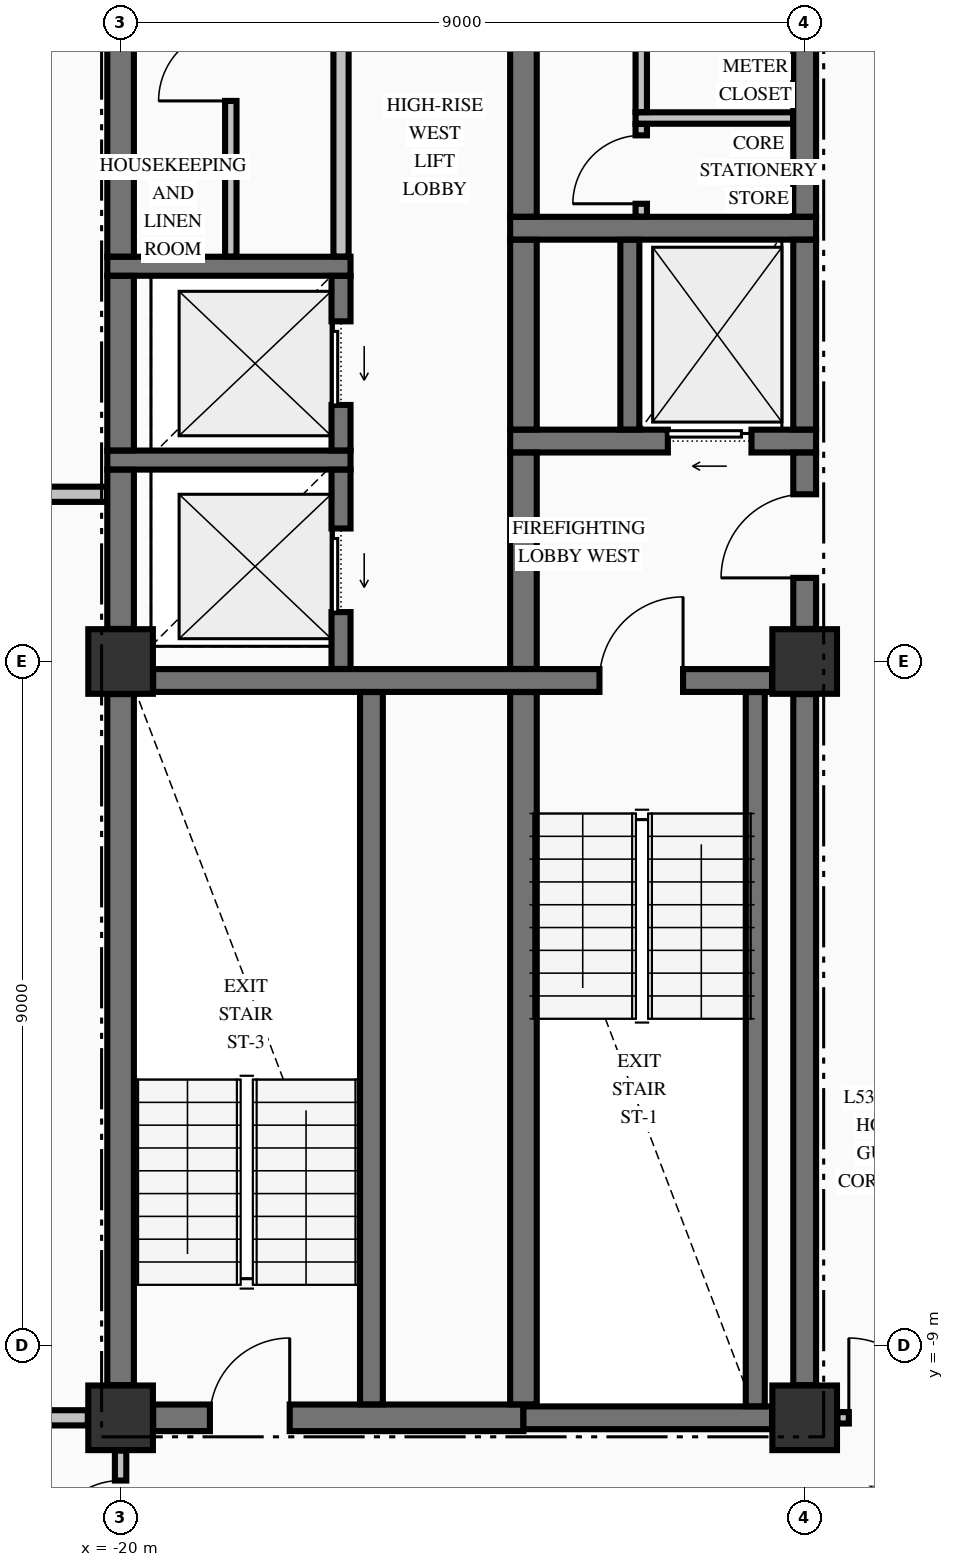
"""IFC4 building model, lengths in metres.
Left out: names, types, materials, properties, quantities, classifications, styles, units other than length and angle.
Written with IfcOpenShell. Run it as: python <this file> out.ifc"""

import sys

from ifc_helpers import new_model, si_unit, direction, frame, frame_2d, origin, origin_2d, place, context, subcontext, project, spatial, rectangle, extrude, element, fill, save


model = new_model("IFC4")
c1 = context("Model", 3, precision=1e-05, world=origin(), true_north=direction((0.0, 1.0)))
c2 = subcontext(c1, "Body", "Model", "MODEL_VIEW")
j1 = project(units=[si_unit("LENGTHUNIT", "METRE"), si_unit("PLANEANGLEUNIT", "RADIAN")], contexts=[c1])
p1 = place(None, origin())
s1 = spatial("IfcSite", under=j1, at=p1, CompositionType="ELEMENT")
p2 = place(p1, origin())
s2 = spatial("IfcBuilding", under=s1, at=p2, CompositionType="ELEMENT")
p3 = place(p2, frame((0.0, 0.0, 205.06)))
s3 = spatial("IfcBuildingStorey", under=s2, at=p3, CompositionType="ELEMENT", Elevation=205.06)
for number, where, z_axis, x_axis in (
    (1, (-20.0, -9.95, -0.25), (0.0, 0.0, 1.0), (1.0, 0.0, 0.0)),
    (2, (-11.0, -9.95, -0.25), (0.0, 0.0, 1.0), (1.0, 0.0, 0.0)),
    (3, (-11.0, 0.0, -0.25), (0.0, 0.0, 1.0), (1.0, 0.0, 0.0)),
    (4, (-20.0, 0.0, -0.25), (0.0, 0.0, 1.0), (1.0, 0.0, 0.0)),
):
    element("IfcColumn", number, at=place(p3, frame(where, z_axis=z_axis, x_axis=x_axis)), inside=s3, PredefinedType="COLUMN", context=c2, shape_type="SweptSolid", body=[
        extrude(rectangle(XDim=0.85, YDim=0.85, at=origin_2d()), origin(), (0.0, 0.0, 1.0), 3.4),
    ])
p4 = place(p3, frame((-19.571, -9.95, 0.0), z_axis=(0.0, 0.0, 1.0), x_axis=(1.0, 0.0, 0.0)))
e5 = element("IfcWall", 5, at=p4, inside=s3, PredefinedType="SHEAR", context=c2, shape_type="SweptSolid", body=[
    extrude(rectangle(XDim=4.871, YDim=0.35, at=frame_2d((2.436, 0.0))), origin(), (0.0, 0.0, 1.0), 3.15),
])
p5 = place(p4, frame((0.746, 0.0, 0.0)))
e6 = element("IfcOpeningElement", 6, at=p5, cuts=e5, PredefinedType="OPENING", context=c2, shape_type="SweptSolid", body=[
    extrude(rectangle(XDim=1.05, YDim=2.15, at=frame_2d((0.525, 1.075))), frame((0.0, 0.185, 0.0), z_axis=(0.0, -1.0, 0.0), x_axis=(1.0, 0.0, 0.0)), (0.0, 0.0, 1.0), 0.37),
])
p6 = place(p3, frame((-14.7, -9.95, 0.0), z_axis=(0.0, 0.0, 1.0), x_axis=(1.0, 0.0, 0.0)))
e7 = element("IfcWall", 7, at=p6, inside=s3, PredefinedType="SHEAR", context=c2, shape_type="SweptSolid", body=[
    extrude(rectangle(XDim=3.271, YDim=0.3, at=frame_2d((1.635, 0.0))), origin(), (0.0, 0.0, 1.0), 3.15),
])
p7 = place(p3, frame((-19.571, -0.25, 0.0), z_axis=(0.0, 0.0, 1.0), x_axis=(1.0, 0.0, 0.0)))
e8 = element("IfcWall", 8, at=p7, inside=s3, PredefinedType="SHEAR", context=c2, shape_type="SweptSolid", body=[
    extrude(rectangle(XDim=8.142, YDim=0.3, at=frame_2d((4.071, 0.0))), origin(), (0.0, 0.0, 1.0), 3.15),
])
p8 = place(p7, frame((5.871, 0.0, 0.0)))
e9 = element("IfcOpeningElement", 9, at=p8, cuts=e8, PredefinedType="OPENING", context=c2, shape_type="SweptSolid", body=[
    extrude(rectangle(XDim=1.1, YDim=2.15, at=frame_2d((0.55, 1.075))), frame((0.0, 0.16, 0.0), z_axis=(0.0, -1.0, 0.0), x_axis=(1.0, 0.0, 0.0)), (0.0, 0.0, 1.0), 0.32),
])
p9 = place(p3, frame((-20.175, 2.65, 0.0), z_axis=(0.0, 0.0, 1.0), x_axis=(1.0, 0.0, 0.0)))
e10 = element("IfcWall", 10, at=p9, inside=s3, PredefinedType="SOLIDWALL", context=c2, shape_type="SweptSolid", body=[
    extrude(rectangle(XDim=3.2, YDim=0.25, at=frame_2d((1.6, 0.0))), origin(), (0.0, 0.0, 1.0), 3.15),
])
p10 = place(p3, frame((-14.875, 2.9, 0.0), z_axis=(0.0, 0.0, 1.0), x_axis=(1.0, 0.0, 0.0)))
e11 = element("IfcWall", 11, at=p10, inside=s3, PredefinedType="SHEAR", context=c2, shape_type="SweptSolid", body=[
    extrude(rectangle(XDim=4.025, YDim=0.3, at=frame_2d((2.012, 0.0))), origin(), (0.0, 0.0, 1.0), 3.15),
])
p11 = place(p10, frame((2.075, 0.0, 0.0)))
e12 = element("IfcOpeningElement", 12, at=p11, cuts=e11, PredefinedType="OPENING", context=c2, shape_type="SweptSolid", body=[
    extrude(rectangle(XDim=1.1, YDim=2.2, at=frame_2d((0.55, 1.1))), frame((0.0, 0.16, 0.0), z_axis=(0.0, -1.0, 0.0), x_axis=(1.0, 0.0, 0.0)), (0.0, 0.0, 1.0), 0.32),
])
p12 = place(p3, frame((-20.175, 5.2, 0.0), z_axis=(0.0, 0.0, 1.0), x_axis=(1.0, 0.0, 0.0)))
e13 = element("IfcWall", 13, at=p12, inside=s3, PredefinedType="SOLIDWALL", context=c2, shape_type="SweptSolid", body=[
    extrude(rectangle(XDim=3.2, YDim=0.25, at=frame_2d((1.6, 0.0))), origin(), (0.0, 0.0, 1.0), 3.15),
])
p13 = place(p3, frame((-14.875, 5.7, 0.0), z_axis=(0.0, 0.0, 1.0), x_axis=(1.0, 0.0, 0.0)))
e14 = element("IfcWall", 14, at=p13, inside=s3, PredefinedType="SHEAR", context=c2, shape_type="SweptSolid", body=[
    extrude(rectangle(XDim=4.025, YDim=0.3, at=frame_2d((2.012, 0.0))), origin(), (0.0, 0.0, 1.0), 3.15),
])
p14 = place(p3, frame((-26.835, -9.95, 0.0), z_axis=(0.0, 0.0, 1.0), x_axis=(1.0, 0.0, 0.0)))
e15 = element("IfcWall", 15, at=p14, inside=s3, PredefinedType="PARTITIONING", context=c2, shape_type="SweptSolid", body=[
    extrude(rectangle(XDim=6.404, YDim=0.2, at=frame_2d((3.202, 0.0))), origin(), (0.0, 0.0, 1.0), 3.15),
])
p15 = place(p14, frame((2.86, 0.0, 0.0)))
e16 = element("IfcOpeningElement", 16, at=p15, cuts=e15, PredefinedType="OPENING", context=c2, shape_type="SweptSolid", body=[
    extrude(rectangle(XDim=0.95, YDim=2.15, at=frame_2d((0.475, 1.075))), frame((0.0, 0.11, 0.0), z_axis=(0.0, -1.0, 0.0), x_axis=(1.0, 0.0, 0.0)), (0.0, 0.0, 1.0), 0.22),
])
p16 = place(p3, frame((-10.569, -9.95, 0.0), z_axis=(0.0, 0.0, 1.0), x_axis=(1.0, 0.0, 0.0)))
e17 = element("IfcWall", 17, at=p16, inside=s3, PredefinedType="PARTITIONING", context=c2, shape_type="SweptSolid", body=[
    extrude(rectangle(XDim=21.138, YDim=0.15, at=frame_2d((10.569, 0.0))), origin(), (0.0, 0.0, 1.0), 3.15),
])
p17 = place(p16, frame((0.15, 0.0, 0.0)))
e18 = element("IfcOpeningElement", 18, at=p17, cuts=e17, PredefinedType="OPENING", context=c2, shape_type="SweptSolid", body=[
    extrude(rectangle(XDim=1.05, YDim=2.15, at=frame_2d((0.525, 1.075))), frame((0.0, 0.085, 0.0), z_axis=(0.0, -1.0, 0.0), x_axis=(1.0, 0.0, 0.0)), (0.0, 0.0, 1.0), 0.17),
])
p18 = place(p16, frame((19.938, 0.0, 0.0)))
e19 = element("IfcOpeningElement", 19, at=p18, cuts=e17, PredefinedType="OPENING", context=c2, shape_type="SweptSolid", body=[
    extrude(rectangle(XDim=1.05, YDim=2.15, at=frame_2d((0.525, 1.075))), frame((0.0, 0.085, 0.0), z_axis=(0.0, -1.0, 0.0), x_axis=(1.0, 0.0, 0.0)), (0.0, 0.0, 1.0), 0.17),
])
p19 = place(p16, frame((13.944, 0.0, 0.0)))
e20 = element("IfcOpeningElement", 20, at=p19, cuts=e17, PredefinedType="OPENING", context=c2, shape_type="SweptSolid", body=[
    extrude(rectangle(XDim=0.95, YDim=2.15, at=frame_2d((0.475, 1.075))), frame((0.0, 0.085, 0.0), z_axis=(0.0, -1.0, 0.0), x_axis=(1.0, 0.0, 0.0)), (0.0, 0.0, 1.0), 0.17),
])
p20 = place(p3, frame((-26.835, 2.2, 0.0), z_axis=(0.0, 0.0, 1.0), x_axis=(1.0, 0.0, 0.0)))
e21 = element("IfcWall", 21, at=p20, inside=s3, PredefinedType="PARTITIONING", context=c2, shape_type="SweptSolid", body=[
    extrude(rectangle(XDim=6.657, YDim=0.2, at=frame_2d((3.329, 0.0))), origin(), (0.0, 0.0, 1.0), 3.15),
])
p21 = place(p3, frame((-13.225, 7.15, 0.0), z_axis=(0.0, 0.0, 1.0), x_axis=(1.0, 0.0, 0.0)))
e22 = element("IfcWall", 22, at=p21, inside=s3, PredefinedType="PARTITIONING", context=c2, shape_type="SweptSolid", body=[
    extrude(rectangle(XDim=2.072, YDim=0.15, at=frame_2d((1.036, 0.0))), origin(), (0.0, 0.0, 1.0), 3.15),
])
p22 = place(p3, frame((-20.0, -9.521, 0.0), z_axis=(0.0, 0.0, 1.0), x_axis=(0.0, 1.0, 0.0)))
e23 = element("IfcWall", 23, at=p22, inside=s3, PredefinedType="SHEAR", context=c2, shape_type="SweptSolid", body=[
    extrude(rectangle(XDim=9.092, YDim=0.35, at=frame_2d((4.546, 0.0))), origin(), (0.0, 0.0, 1.0), 3.15),
])
p23 = place(p3, frame((-20.0, 0.429, 0.0), z_axis=(0.0, 0.0, 1.0), x_axis=(0.0, 1.0, 0.0)))
e24 = element("IfcWall", 24, at=p23, inside=s3, PredefinedType="SHEAR", context=c2, shape_type="SweptSolid", body=[
    extrude(rectangle(XDim=2.094, YDim=0.35, at=frame_2d((1.047, 0.0))), origin(), (0.0, 0.0, 1.0), 3.15),
])
p24 = place(p3, frame((-20.0, 2.777, 0.0), z_axis=(0.0, 0.0, 1.0), x_axis=(0.0, 1.0, 0.0)))
e25 = element("IfcWall", 25, at=p24, inside=s3, PredefinedType="SHEAR", context=c2, shape_type="SweptSolid", body=[
    extrude(rectangle(XDim=2.296, YDim=0.35, at=frame_2d((1.148, 0.0))), origin(), (0.0, 0.0, 1.0), 3.15),
])
p25 = place(p3, frame((-20.0, 5.327, 0.0), z_axis=(0.0, 0.0, 1.0), x_axis=(0.0, 1.0, 0.0)))
e26 = element("IfcWall", 26, at=p25, inside=s3, PredefinedType="SHEAR", context=c2, shape_type="SweptSolid", body=[
    extrude(rectangle(XDim=4.744, YDim=0.35, at=frame_2d((2.372, 0.0))), origin(), (0.0, 0.0, 1.0), 3.15),
])
p26 = place(p3, frame((-17.1, -0.098, 0.0), z_axis=(0.0, 0.0, 1.0), x_axis=(0.0, 1.0, 0.0)))
e27 = element("IfcWall", 27, at=p26, inside=s3, PredefinedType="SOLIDWALL", context=c2, shape_type="SweptSolid", body=[
    extrude(rectangle(XDim=2.621, YDim=0.25, at=frame_2d((1.311, 0.0))), origin(), (0.0, 0.0, 1.0), 3.15),
])
p27 = place(p26, frame((0.748, 0.0, 0.0)))
e28 = element("IfcOpeningElement", 28, at=p27, cuts=e27, PredefinedType="OPENING", context=c2, shape_type="SweptSolid", body=[
    extrude(rectangle(XDim=1.1, YDim=2.2, at=frame_2d((0.55, 1.1))), frame((0.0, 0.135, 0.0), z_axis=(0.0, -1.0, 0.0), x_axis=(1.0, 0.0, 0.0)), (0.0, 0.0, 1.0), 0.27),
])
p28 = place(p3, frame((-17.1, 2.777, 0.0), z_axis=(0.0, 0.0, 1.0), x_axis=(0.0, 1.0, 0.0)))
e29 = element("IfcWall", 29, at=p28, inside=s3, PredefinedType="SOLIDWALL", context=c2, shape_type="SweptSolid", body=[
    extrude(rectangle(XDim=2.296, YDim=0.25, at=frame_2d((1.148, 0.0))), origin(), (0.0, 0.0, 1.0), 3.15),
])
p29 = place(p28, frame((0.598, 0.0, 0.0)))
e30 = element("IfcOpeningElement", 30, at=p29, cuts=e29, PredefinedType="OPENING", context=c2, shape_type="SweptSolid", body=[
    extrude(rectangle(XDim=1.1, YDim=2.2, at=frame_2d((0.55, 1.1))), frame((0.0, 0.135, 0.0), z_axis=(0.0, -1.0, 0.0), x_axis=(1.0, 0.0, 0.0)), (0.0, 0.0, 1.0), 0.27),
])
p30 = place(p3, frame((-16.7, -9.773, 0.0), z_axis=(0.0, 0.0, 1.0), x_axis=(0.0, 1.0, 0.0)))
e31 = element("IfcWall", 31, at=p30, inside=s3, PredefinedType="SHEAR", context=c2, shape_type="SweptSolid", body=[
    extrude(rectangle(XDim=9.371, YDim=0.3, at=frame_2d((4.686, 0.0))), origin(), (0.0, 0.0, 1.0), 3.15),
])
p31 = place(p3, frame((-14.7, -9.773, 0.0), z_axis=(0.0, 0.0, 1.0), x_axis=(0.0, 1.0, 0.0)))
e32 = element("IfcWall", 32, at=p31, inside=s3, PredefinedType="SHEAR", context=c2, shape_type="SweptSolid", body=[
    extrude(rectangle(XDim=9.371, YDim=0.35, at=frame_2d((4.686, 0.0))), origin(), (0.0, 0.0, 1.0), 3.15),
])
p32 = place(p3, frame((-14.7, -0.098, 0.0), z_axis=(0.0, 0.0, 1.0), x_axis=(0.0, 1.0, 0.0)))
e33 = element("IfcWall", 33, at=p32, inside=s3, PredefinedType="SHEAR", context=c2, shape_type="SweptSolid", body=[
    extrude(rectangle(XDim=2.846, YDim=0.35, at=frame_2d((1.423, 0.0))), origin(), (0.0, 0.0, 1.0), 3.15),
])
p33 = place(p3, frame((-14.7, 3.052, 0.0), z_axis=(0.0, 0.0, 1.0), x_axis=(0.0, 1.0, 0.0)))
e34 = element("IfcWall", 34, at=p33, inside=s3, PredefinedType="SHEAR", context=c2, shape_type="SweptSolid", body=[
    extrude(rectangle(XDim=2.496, YDim=0.35, at=frame_2d((1.248, 0.0))), origin(), (0.0, 0.0, 1.0), 3.15),
])
p34 = place(p3, frame((-14.7, 5.852, 0.0), z_axis=(0.0, 0.0, 1.0), x_axis=(0.0, 1.0, 0.0)))
e35 = element("IfcWall", 35, at=p34, inside=s3, PredefinedType="SHEAR", context=c2, shape_type="SweptSolid", body=[
    extrude(rectangle(XDim=4.471, YDim=0.35, at=frame_2d((2.235, 0.0))), origin(), (0.0, 0.0, 1.0), 3.15),
])
p35 = place(p3, frame((-13.3, 3.052, 0.0), z_axis=(0.0, 0.0, 1.0), x_axis=(0.0, 1.0, 0.0)))
e36 = element("IfcWall", 36, at=p35, inside=s3, PredefinedType="SOLIDWALL", context=c2, shape_type="SweptSolid", body=[
    extrude(rectangle(XDim=2.496, YDim=0.25, at=frame_2d((1.248, 0.0))), origin(), (0.0, 0.0, 1.0), 3.15),
])
p36 = place(p3, frame((-11.65, -9.798, 0.0), z_axis=(0.0, 0.0, 1.0), x_axis=(0.0, 1.0, 0.0)))
e37 = element("IfcWall", 37, at=p36, inside=s3, PredefinedType="SOLIDWALL", context=c2, shape_type="SweptSolid", body=[
    extrude(rectangle(XDim=9.396, YDim=0.25, at=frame_2d((4.698, 0.0))), origin(), (0.0, 0.0, 1.0), 3.15),
])
p37 = place(p3, frame((-11.0, -9.521, 0.0), z_axis=(0.0, 0.0, 1.0), x_axis=(0.0, 1.0, 0.0)))
e38 = element("IfcWall", 38, at=p37, inside=s3, PredefinedType="SHEAR", context=c2, shape_type="SweptSolid", body=[
    extrude(rectangle(XDim=9.092, YDim=0.3, at=frame_2d((4.546, 0.0))), origin(), (0.0, 0.0, 1.0), 3.15),
])
p38 = place(p3, frame((-11.0, 0.429, 0.0), z_axis=(0.0, 0.0, 1.0), x_axis=(0.0, 1.0, 0.0)))
e39 = element("IfcWall", 39, at=p38, inside=s3, PredefinedType="SHEAR", context=c2, shape_type="SweptSolid", body=[
    extrude(rectangle(XDim=2.319, YDim=0.3, at=frame_2d((1.16, 0.0))), origin(), (0.0, 0.0, 1.0), 3.15),
])
p39 = place(p38, frame((0.671, 0.0, 0.0)))
e40 = element("IfcOpeningElement", 40, at=p39, cuts=e39, PredefinedType="OPENING", context=c2, shape_type="SweptSolid", body=[
    extrude(rectangle(XDim=1.1, YDim=2.15, at=frame_2d((0.55, 1.075))), frame((0.0, 0.16, 0.0), z_axis=(0.0, -1.0, 0.0), x_axis=(1.0, 0.0, 0.0)), (0.0, 0.0, 1.0), 0.32),
])
p40 = place(p3, frame((-11.0, 3.052, 0.0), z_axis=(0.0, 0.0, 1.0), x_axis=(0.0, 1.0, 0.0)))
e41 = element("IfcWall", 41, at=p40, inside=s3, PredefinedType="SHEAR", context=c2, shape_type="SweptSolid", body=[
    extrude(rectangle(XDim=2.496, YDim=0.3, at=frame_2d((1.248, 0.0))), origin(), (0.0, 0.0, 1.0), 3.15),
])
p41 = place(p3, frame((-11.0, 5.852, 0.0), z_axis=(0.0, 0.0, 1.0), x_axis=(0.0, 1.0, 0.0)))
e42 = element("IfcWall", 42, at=p41, inside=s3, PredefinedType="SHEAR", context=c2, shape_type="SweptSolid", body=[
    extrude(rectangle(XDim=4.219, YDim=0.3, at=frame_2d((2.109, 0.0))), origin(), (0.0, 0.0, 1.0), 3.15),
])
p42 = place(p3, frame((-20.0, -12.447, 0.0), z_axis=(0.0, 0.0, 1.0), x_axis=(0.0, 1.0, 0.0)))
e43 = element("IfcWall", 43, at=p42, inside=s3, PredefinedType="PARTITIONING", context=c2, shape_type="SweptSolid", body=[
    extrude(rectangle(XDim=2.066, YDim=0.15, at=frame_2d((1.033, 0.0))), origin(), (0.0, 0.0, 1.0), 2.342),
])
p43 = place(p42, frame((0.722, 0.0, 0.0)))
e44 = element("IfcOpeningElement", 44, at=p43, cuts=e43, PredefinedType="OPENING", context=c2, shape_type="SweptSolid", body=[
    extrude(rectangle(XDim=0.95, YDim=2.15, at=frame_2d((0.475, 1.075))), frame((0.0, 0.085, 0.0), z_axis=(0.0, -1.0, 0.0), x_axis=(1.0, 0.0, 0.0)), (0.0, 0.0, 1.0), 0.17),
])
p44 = place(p3, frame((-18.55, 5.328, 0.0), z_axis=(0.0, 0.0, 1.0), x_axis=(0.0, 1.0, 0.0)))
e45 = element("IfcWall", 45, at=p44, inside=s3, PredefinedType="PARTITIONING", context=c2, shape_type="SweptSolid", body=[
    extrude(rectangle(XDim=4.994, YDim=0.15, at=frame_2d((2.497, 0.0))), origin(), (0.0, 0.0, 1.0), 3.15),
])
p45 = place(p44, frame((2.047, 0.0, 0.0)))
e46 = element("IfcOpeningElement", 46, at=p45, cuts=e45, PredefinedType="OPENING", context=c2, shape_type="SweptSolid", body=[
    extrude(rectangle(XDim=0.95, YDim=2.15, at=frame_2d((0.475, 1.075))), frame((0.0, 0.085, 0.0), z_axis=(0.0, -1.0, 0.0), x_axis=(1.0, 0.0, 0.0)), (0.0, 0.0, 1.0), 0.17),
])
p46 = place(p3, frame((-17.1, 5.328, 0.0), z_axis=(0.0, 0.0, 1.0), x_axis=(0.0, 1.0, 0.0)))
e47 = element("IfcWall", 47, at=p46, inside=s3, PredefinedType="PARTITIONING", context=c2, shape_type="SweptSolid", body=[
    extrude(rectangle(XDim=4.994, YDim=0.2, at=frame_2d((2.497, 0.0))), origin(), (0.0, 0.0, 1.0), 3.15),
])
p47 = place(p3, frame((-13.15, 5.853, 0.0), z_axis=(0.0, 0.0, 1.0), x_axis=(0.0, 1.0, 0.0)))
e48 = element("IfcWall", 48, at=p47, inside=s3, PredefinedType="PARTITIONING", context=c2, shape_type="SweptSolid", body=[
    extrude(rectangle(XDim=1.219, YDim=0.15, at=frame_2d((0.609, 0.0))), origin(), (0.0, 0.0, 1.0), 3.15),
])
p48 = place(p47, frame((0.169, 0.0, 0.0)))
e49 = element("IfcOpeningElement", 49, at=p48, cuts=e48, PredefinedType="OPENING", context=c2, shape_type="SweptSolid", body=[
    extrude(rectangle(XDim=0.9, YDim=2.15, at=frame_2d((0.45, 1.075))), frame((0.0, 0.085, 0.0), z_axis=(0.0, -1.0, 0.0), x_axis=(1.0, 0.0, 0.0)), (0.0, 0.0, 1.0), 0.17),
])
p49 = place(p3, frame((-13.15, 7.228, 0.0), z_axis=(0.0, 0.0, 1.0), x_axis=(0.0, 1.0, 0.0)))
e50 = element("IfcWall", 50, at=p49, inside=s3, PredefinedType="PARTITIONING", context=c2, shape_type="SweptSolid", body=[
    extrude(rectangle(XDim=3.119, YDim=0.15, at=frame_2d((1.56, 0.0))), origin(), (0.0, 0.0, 1.0), 3.15),
])
p50 = place(p49, frame((1.097, 0.0, 0.0)))
e51 = element("IfcOpeningElement", 51, at=p50, cuts=e50, PredefinedType="OPENING", context=c2, shape_type="SweptSolid", body=[
    extrude(rectangle(XDim=0.95, YDim=2.15, at=frame_2d((0.475, 1.075))), frame((0.0, 0.085, 0.0), z_axis=(0.0, -1.0, 0.0), x_axis=(1.0, 0.0, 0.0)), (0.0, 0.0, 1.0), 0.17),
])
p51 = place(p8, origin())
e52 = element("IfcDoor", 52, at=p51, inside=s3, OperationType="SINGLE_SWING_RIGHT", PredefinedType="DOOR", context=c2, shape_type="SweptSolid", body=[
    extrude(rectangle(XDim=1.1, YDim=2.15, at=frame_2d((0.55, 1.075))), frame((0.0, 0.025, 0.0), z_axis=(0.0, -1.0, 0.0), x_axis=(1.0, 0.0, 0.0)), (0.0, 0.0, 1.0), 0.05),
])
fill(e9, e52)
p52 = place(p39, origin())
e53 = element("IfcDoor", 53, at=p52, inside=s3, OperationType="SINGLE_SWING_LEFT", PredefinedType="DOOR", context=c2, shape_type="SweptSolid", body=[
    extrude(rectangle(XDim=1.1, YDim=2.15, at=frame_2d((0.55, 1.075))), frame((0.0, 0.025, 0.0), z_axis=(0.0, -1.0, 0.0), x_axis=(1.0, 0.0, 0.0)), (0.0, 0.0, 1.0), 0.05),
])
fill(e40, e53)
p53 = place(p11, origin())
e54 = element("IfcDoor", 54, at=p53, inside=s3, OperationType="SLIDING_TO_LEFT", PredefinedType="DOOR", context=c2, shape_type="SweptSolid", body=[
    extrude(rectangle(XDim=1.1, YDim=2.2, at=frame_2d((0.55, 1.1))), frame((0.0, 0.025, 0.0), z_axis=(0.0, -1.0, 0.0), x_axis=(1.0, 0.0, 0.0)), (0.0, 0.0, 1.0), 0.05),
])
fill(e12, e54)
p54 = place(p48, origin())
e55 = element("IfcDoor", 55, at=p54, inside=s3, OperationType="SINGLE_SWING_LEFT", PredefinedType="DOOR", context=c2, shape_type="SweptSolid", body=[
    extrude(rectangle(XDim=0.9, YDim=2.15, at=frame_2d((0.45, 1.075))), frame((0.0, 0.025, 0.0), z_axis=(0.0, -1.0, 0.0), x_axis=(1.0, 0.0, 0.0)), (0.0, 0.0, 1.0), 0.05),
])
fill(e49, e55)
p55 = place(p5, origin())
e56 = element("IfcDoor", 56, at=p55, inside=s3, OperationType="SINGLE_SWING_RIGHT", PredefinedType="DOOR", context=c2, shape_type="SweptSolid", body=[
    extrude(rectangle(XDim=1.05, YDim=2.15, at=frame_2d((0.525, 1.075))), frame((0.0, 0.025, 0.0), z_axis=(0.0, -1.0, 0.0), x_axis=(1.0, 0.0, 0.0)), (0.0, 0.0, 1.0), 0.05),
])
fill(e6, e56)
p56 = place(p27, origin())
e57 = element("IfcDoor", 57, at=p56, inside=s3, OperationType="SLIDING_TO_LEFT", PredefinedType="DOOR", context=c2, shape_type="SweptSolid", body=[
    extrude(rectangle(XDim=1.1, YDim=2.2, at=frame_2d((0.55, 1.1))), frame((0.0, 0.025, 0.0), z_axis=(0.0, -1.0, 0.0), x_axis=(1.0, 0.0, 0.0)), (0.0, 0.0, 1.0), 0.05),
])
fill(e28, e57)
p57 = place(p29, origin())
e58 = element("IfcDoor", 58, at=p57, inside=s3, OperationType="SLIDING_TO_LEFT", PredefinedType="DOOR", context=c2, shape_type="SweptSolid", body=[
    extrude(rectangle(XDim=1.1, YDim=2.2, at=frame_2d((0.55, 1.1))), frame((0.0, 0.025, 0.0), z_axis=(0.0, -1.0, 0.0), x_axis=(1.0, 0.0, 0.0)), (0.0, 0.0, 1.0), 0.05),
])
fill(e30, e58)
p58 = place(p45, origin())
e59 = element("IfcDoor", 59, at=p58, inside=s3, OperationType="SINGLE_SWING_LEFT", PredefinedType="DOOR", context=c2, shape_type="SweptSolid", body=[
    extrude(rectangle(XDim=0.95, YDim=2.15, at=frame_2d((0.475, 1.075))), frame((0.0, 0.025, 0.0), z_axis=(0.0, -1.0, 0.0), x_axis=(1.0, 0.0, 0.0)), (0.0, 0.0, 1.0), 0.05),
])
fill(e46, e59)
p59 = place(p17, origin())
e60 = element("IfcDoor", 60, at=p59, inside=s3, OperationType="SINGLE_SWING_LEFT", PredefinedType="DOOR", context=c2, shape_type="SweptSolid", body=[
    extrude(rectangle(XDim=1.05, YDim=2.15, at=frame_2d((0.525, 1.075))), frame((0.0, 0.025, 0.0), z_axis=(0.0, -1.0, 0.0), x_axis=(1.0, 0.0, 0.0)), (0.0, 0.0, 1.0), 0.05),
])
fill(e18, e60)
p60 = place(p43, origin())
e61 = element("IfcDoor", 61, at=p60, inside=s3, OperationType="SINGLE_SWING_LEFT", PredefinedType="DOOR", context=c2, shape_type="SweptSolid", body=[
    extrude(rectangle(XDim=0.95, YDim=2.15, at=frame_2d((0.475, 1.075))), frame((0.0, 0.025, 0.0), z_axis=(0.0, -1.0, 0.0), x_axis=(1.0, 0.0, 0.0)), (0.0, 0.0, 1.0), 0.05),
])
fill(e44, e61)
save(model, sys.argv[1])
